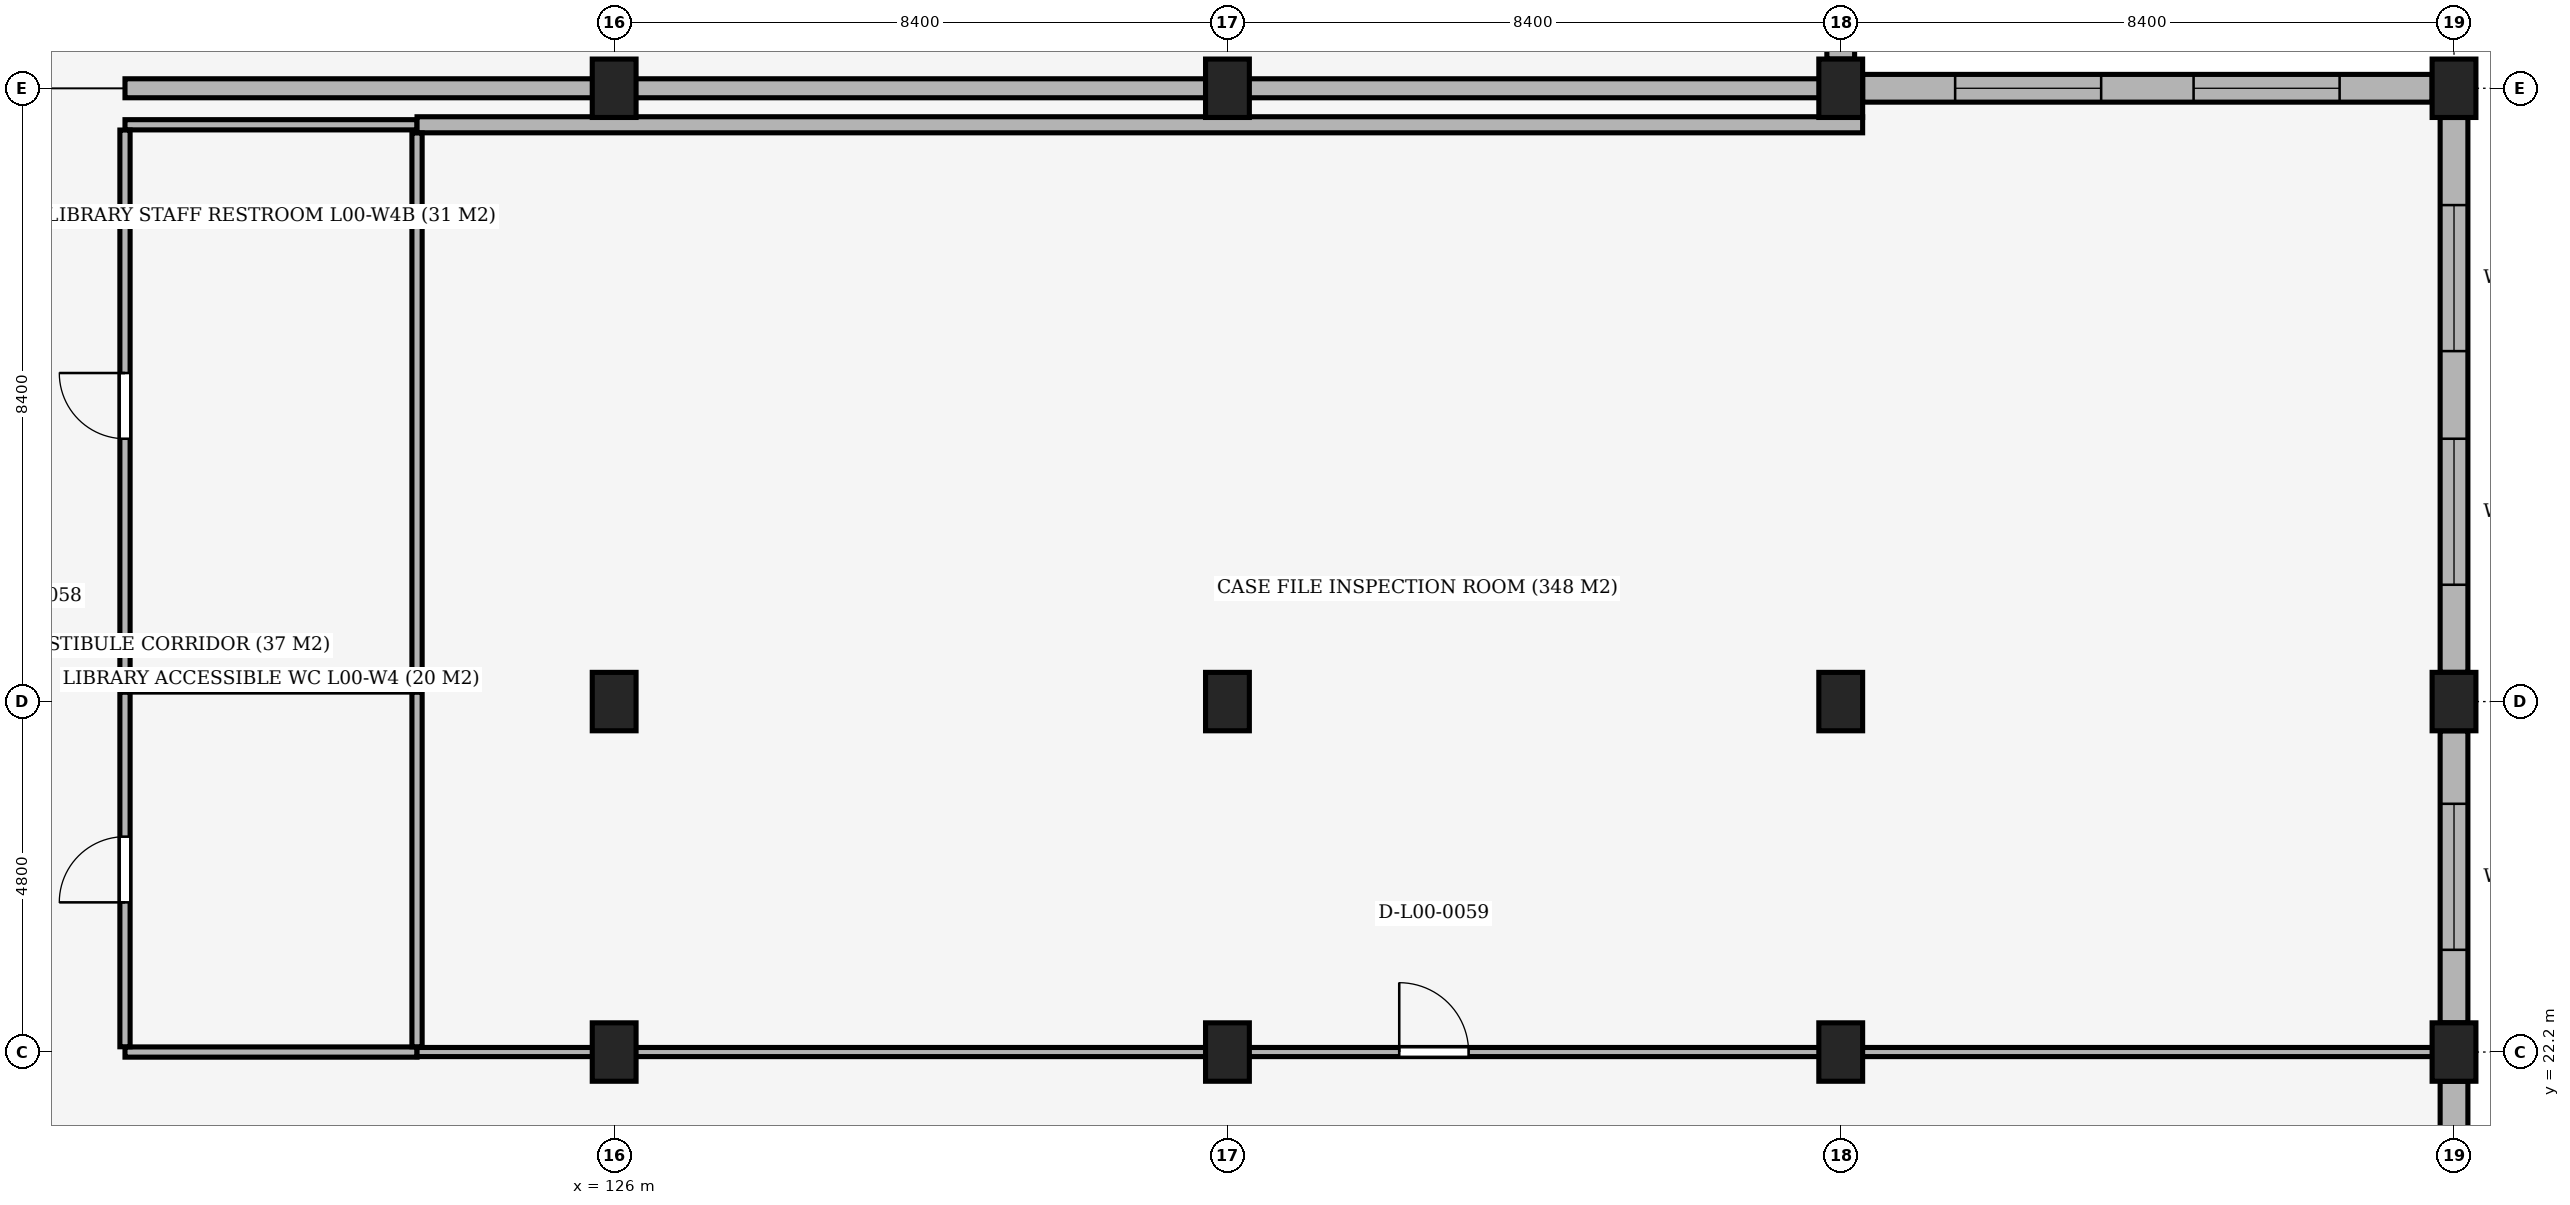
"""IFC4 building model, lengths in metres.
Left out: names, types, materials, properties, quantities, classifications, styles, units other than length and angle.
Written with IfcOpenShell. Run it as: python <this file> out.ifc"""

import sys

from ifc_helpers import new_model, si_unit, direction, frame, frame_2d, origin, origin_2d, place, context, subcontext, project, spatial, rectangle, extrude, element, fill, save


model = new_model("IFC4")
c1 = context("Model", 3, precision=1e-05, world=origin(), true_north=direction((0.0, 1.0)))
c2 = subcontext(c1, "Body", "Model", "MODEL_VIEW")
j1 = project(units=[si_unit("LENGTHUNIT", "METRE"), si_unit("PLANEANGLEUNIT", "RADIAN")], contexts=[c1])
p1 = place(None, origin())
s1 = spatial("IfcSite", under=j1, at=p1, CompositionType="ELEMENT")
p2 = place(p1, origin())
s2 = spatial("IfcBuilding", under=s1, at=p2, CompositionType="ELEMENT")
p3 = place(p2, origin())
s3 = spatial("IfcBuildingStorey", under=s2, at=p3, CompositionType="ELEMENT", Elevation=0.0)
for number, where, z_axis, x_axis in (
    (1, (126.0, 22.2, 0.0), (0.0, 0.0, 1.0), (1.0, 0.0, 0.0)),
    (2, (126.0, 27.0, 0.0), (0.0, 0.0, 1.0), (1.0, 0.0, 0.0)),
    (3, (126.0, 35.4, 0.0), (0.0, 0.0, 1.0), (1.0, 0.0, 0.0)),
    (4, (134.4, 22.2, 0.0), (0.0, 0.0, 1.0), (1.0, 0.0, 0.0)),
    (5, (134.4, 27.0, 0.0), (0.0, 0.0, 1.0), (1.0, 0.0, 0.0)),
    (6, (134.4, 35.4, 0.0), (0.0, 0.0, 1.0), (1.0, 0.0, 0.0)),
    (7, (142.8, 22.2, 0.0), (0.0, 0.0, 1.0), (1.0, 0.0, 0.0)),
    (8, (142.8, 27.0, 0.0), (0.0, 0.0, 1.0), (1.0, 0.0, 0.0)),
    (9, (142.8, 35.4, 0.0), (0.0, 0.0, 1.0), (1.0, 0.0, 0.0)),
    (10, (151.2, 22.2, 0.0), (0.0, 0.0, 1.0), (1.0, 0.0, 0.0)),
    (11, (151.2, 27.0, 0.0), (0.0, 0.0, 1.0), (1.0, 0.0, 0.0)),
    (12, (151.2, 35.4, 0.0), (0.0, 0.0, 1.0), (1.0, 0.0, 0.0)),
):
    element("IfcColumn", number, at=place(p3, frame(where, z_axis=z_axis, x_axis=x_axis)), inside=s3, PredefinedType="COLUMN", context=c2, shape_type="SweptSolid", body=[
        extrude(rectangle(XDim=0.6, YDim=0.8, at=origin_2d()), origin(), (0.0, 0.0, 1.0), 5.1),
    ])
p4 = place(p3, frame((142.8, 40.575, 0.0), z_axis=(0.0, 0.0, 1.0), x_axis=(0.0, -1.0, 0.0)))
e13 = element("IfcWall", 13, at=p4, inside=s3, PredefinedType="SOLIDWALL", context=c2, shape_type="SweptSolid", body=[
    extrude(rectangle(XDim=4.775, YDim=0.38, at=frame_2d((2.387, 0.0))), origin(), (0.0, 0.0, 1.0), 4.02),
])
p5 = place(p4, frame((1.388, 0.0, 2.1)))
e14 = element("IfcOpeningElement", 14, at=p5, cuts=e13, PredefinedType="OPENING", context=c2, shape_type="SweptSolid", body=[
    extrude(rectangle(XDim=2.0, YDim=1.2, at=frame_2d((1.0, 0.6))), frame((0.0, 0.205, 0.0), z_axis=(0.0, -1.0, 0.0), x_axis=(1.0, 0.0, 0.0)), (0.0, 0.0, 1.0), 0.41),
])
p6 = place(p3, frame((143.1, 35.4, 0.0), z_axis=(0.0, 0.0, 1.0), x_axis=(1.0, 0.0, 0.0)))
e15 = element("IfcWall", 15, at=p6, inside=s3, PredefinedType="SOLIDWALL", context=c2, shape_type="SweptSolid", body=[
    extrude(rectangle(XDim=7.8, YDim=0.38, at=frame_2d((3.9, 0.0))), origin(), (0.0, 0.0, 1.0), 4.07),
])
p7 = place(p6, frame((1.267, 0.0, 2.1)))
e16 = element("IfcOpeningElement", 16, at=p7, cuts=e15, PredefinedType="OPENING", context=c2, shape_type="SweptSolid", body=[
    extrude(rectangle(XDim=2.0, YDim=1.2, at=frame_2d((1.0, 0.6))), frame((0.0, 0.205, 0.0), z_axis=(0.0, -1.0, 0.0), x_axis=(1.0, 0.0, 0.0)), (0.0, 0.0, 1.0), 0.41),
])
p8 = place(p6, frame((4.533, 0.0, 2.1)))
e17 = element("IfcOpeningElement", 17, at=p8, cuts=e15, PredefinedType="OPENING", context=c2, shape_type="SweptSolid", body=[
    extrude(rectangle(XDim=2.0, YDim=1.2, at=frame_2d((1.0, 0.6))), frame((0.0, 0.205, 0.0), z_axis=(0.0, -1.0, 0.0), x_axis=(1.0, 0.0, 0.0)), (0.0, 0.0, 1.0), 0.41),
])
p9 = place(p3, frame((151.2, 35.0, 0.0), z_axis=(0.0, 0.0, 1.0), x_axis=(0.0, -1.0, 0.0)))
e18 = element("IfcWall", 18, at=p9, inside=s3, PredefinedType="SOLIDWALL", context=c2, shape_type="SweptSolid", body=[
    extrude(rectangle(XDim=7.6, YDim=0.38, at=frame_2d((3.8, 0.0))), origin(), (0.0, 0.0, 1.0), 4.02),
])
p10 = place(p9, frame((1.2, 0.0, 2.1)))
e19 = element("IfcOpeningElement", 19, at=p10, cuts=e18, PredefinedType="OPENING", context=c2, shape_type="SweptSolid", body=[
    extrude(rectangle(XDim=2.0, YDim=1.2, at=frame_2d((1.0, 0.6))), frame((0.0, 0.205, 0.0), z_axis=(0.0, -1.0, 0.0), x_axis=(1.0, 0.0, 0.0)), (0.0, 0.0, 1.0), 0.41),
])
p11 = place(p9, frame((4.4, 0.0, 2.1)))
e20 = element("IfcOpeningElement", 20, at=p11, cuts=e18, PredefinedType="OPENING", context=c2, shape_type="SweptSolid", body=[
    extrude(rectangle(XDim=2.0, YDim=1.2, at=frame_2d((1.0, 0.6))), frame((0.0, 0.205, 0.0), z_axis=(0.0, -1.0, 0.0), x_axis=(1.0, 0.0, 0.0)), (0.0, 0.0, 1.0), 0.41),
])
p12 = place(p3, frame((151.2, 26.6, 0.0), z_axis=(0.0, 0.0, 1.0), x_axis=(0.0, -1.0, 0.0)))
e21 = element("IfcWall", 21, at=p12, inside=s3, PredefinedType="SOLIDWALL", context=c2, shape_type="SweptSolid", body=[
    extrude(rectangle(XDim=4.0, YDim=0.38, at=frame_2d((2.0, 0.0))), origin(), (0.0, 0.0, 1.0), 4.17),
])
p13 = place(p12, frame((1.0, 0.0, 2.1)))
e22 = element("IfcOpeningElement", 22, at=p13, cuts=e21, PredefinedType="OPENING", context=c2, shape_type="SweptSolid", body=[
    extrude(rectangle(XDim=2.0, YDim=1.2, at=frame_2d((1.0, 0.6))), frame((0.0, 0.205, 0.0), z_axis=(0.0, -1.0, 0.0), x_axis=(1.0, 0.0, 0.0)), (0.0, 0.0, 1.0), 0.41),
])
p14 = place(p3, frame((151.2, 21.8, 0.0), z_axis=(0.0, 0.0, 1.0), x_axis=(0.0, -1.0, 0.0)))
e23 = element("IfcWall", 23, at=p14, inside=s3, PredefinedType="SOLIDWALL", context=c2, shape_type="SweptSolid", body=[
    extrude(rectangle(XDim=16.0, YDim=0.38, at=frame_2d((8.0, 0.0))), origin(), (0.0, 0.0, 1.0), 3.67),
])
p15 = place(p14, frame((4.0, 0.0, 2.1)))
e24 = element("IfcOpeningElement", 24, at=p15, cuts=e23, PredefinedType="OPENING", context=c2, shape_type="SweptSolid", body=[
    extrude(rectangle(XDim=2.0, YDim=1.2, at=frame_2d((1.0, 0.6))), frame((0.0, 0.205, 0.0), z_axis=(0.0, -1.0, 0.0), x_axis=(1.0, 0.0, 0.0)), (0.0, 0.0, 1.0), 0.41),
])
p16 = place(p14, frame((10.0, 0.0, 2.1)))
e25 = element("IfcOpeningElement", 25, at=p16, cuts=e23, PredefinedType="OPENING", context=c2, shape_type="SweptSolid", body=[
    extrude(rectangle(XDim=2.0, YDim=1.2, at=frame_2d((1.0, 0.6))), frame((0.0, 0.205, 0.0), z_axis=(0.0, -1.0, 0.0), x_axis=(1.0, 0.0, 0.0)), (0.0, 0.0, 1.0), 0.41),
])
p17 = place(p3, frame((119.3, 22.2, 0.0), z_axis=(0.0, 0.0, 1.0), x_axis=(1.0, 0.0, 0.0)))
e26 = element("IfcWall", 26, at=p17, inside=s3, PredefinedType="PARTITIONING", context=c2, shape_type="SweptSolid", body=[
    extrude(rectangle(XDim=4.0, YDim=0.14, at=frame_2d((2.0, 0.0))), origin(), (0.0, 0.0, 1.0), 4.07),
])
p18 = place(p3, frame((123.3, 22.2, 0.0), z_axis=(0.0, 0.0, 1.0), x_axis=(1.0, 0.0, 0.0)))
e27 = element("IfcWall", 27, at=p18, inside=s3, PredefinedType="PARTITIONING", context=c2, shape_type="SweptSolid", body=[
    extrude(rectangle(XDim=27.855, YDim=0.125, at=frame_2d((13.927, 0.0))), origin(), (0.0, 0.0, 1.0), 3.67),
])
p19 = place(p18, frame((13.453, 0.0, 0.0)))
e28 = element("IfcOpeningElement", 28, at=p19, cuts=e27, PredefinedType="OPENING", context=c2, shape_type="SweptSolid", body=[
    extrude(rectangle(XDim=0.95, YDim=2.2, at=frame_2d((0.475, 1.1))), frame((0.0, 0.077, 0.0), z_axis=(0.0, -1.0, 0.0), x_axis=(1.0, 0.0, 0.0)), (0.0, 0.0, 1.0), 0.155),
])
p20 = place(p3, frame((119.3, 27.2, 0.0), z_axis=(0.0, 0.0, 1.0), x_axis=(1.0, 0.0, 0.0)))
e29 = element("IfcWall", 29, at=p20, inside=s3, PredefinedType="PARTITIONING", context=c2, shape_type="SweptSolid", body=[
    extrude(rectangle(XDim=4.0, YDim=0.14, at=frame_2d((2.0, 0.0))), origin(), (0.0, 0.0, 1.0), 4.07),
])
p21 = place(p3, frame((119.3, 34.9, 0.0), z_axis=(0.0, 0.0, 1.0), x_axis=(1.0, 0.0, 0.0)))
e30 = element("IfcWall", 30, at=p21, inside=s3, PredefinedType="PARTITIONING", context=c2, shape_type="SweptSolid", body=[
    extrude(rectangle(XDim=4.0, YDim=0.14, at=frame_2d((2.0, 0.0))), origin(), (0.0, 0.0, 1.0), 4.82),
])
p22 = place(p3, frame((123.3, 34.9, 0.0), z_axis=(0.0, 0.0, 1.0), x_axis=(1.0, 0.0, 0.0)))
e31 = element("IfcWall", 31, at=p22, inside=s3, PredefinedType="PARTITIONING", context=c2, shape_type="SweptSolid", body=[
    extrude(rectangle(XDim=19.8, YDim=0.22, at=frame_2d((9.9, 0.0))), origin(), (0.0, 0.0, 1.0), 4.02),
])
p23 = place(p3, frame((119.3, 35.4, 0.0), z_axis=(0.0, 0.0, 1.0), x_axis=(1.0, 0.0, 0.0)))
e32 = element("IfcWall", 32, at=p23, inside=s3, PredefinedType="PARTITIONING", context=c2, shape_type="SweptSolid", body=[
    extrude(rectangle(XDim=23.481, YDim=0.26, at=frame_2d((11.74, 0.0))), origin(), (0.0, 0.0, 1.0), 4.07),
])
p24 = place(p3, frame((119.3, 22.272, 0.0), z_axis=(0.0, 0.0, 1.0), x_axis=(0.0, 1.0, 0.0)))
e33 = element("IfcWall", 33, at=p24, inside=s3, PredefinedType="PARTITIONING", context=c2, shape_type="SweptSolid", body=[
    extrude(rectangle(XDim=4.856, YDim=0.14, at=frame_2d((2.428, 0.0))), origin(), (0.0, 0.0, 1.0), 4.07),
])
p25 = place(p24, frame((1.978, 0.0, 0.0)))
e34 = element("IfcOpeningElement", 34, at=p25, cuts=e33, PredefinedType="OPENING", context=c2, shape_type="SweptSolid", body=[
    extrude(rectangle(XDim=0.9, YDim=2.1, at=frame_2d((0.45, 1.05))), frame((0.0, 0.085, 0.0), z_axis=(0.0, -1.0, 0.0), x_axis=(1.0, 0.0, 0.0)), (0.0, 0.0, 1.0), 0.17),
])
p26 = place(p3, frame((119.3, 27.272, 0.0), z_axis=(0.0, 0.0, 1.0), x_axis=(0.0, 1.0, 0.0)))
e35 = element("IfcWall", 35, at=p26, inside=s3, PredefinedType="PARTITIONING", context=c2, shape_type="SweptSolid", body=[
    extrude(rectangle(XDim=7.556, YDim=0.14, at=frame_2d((3.778, 0.0))), origin(), (0.0, 0.0, 1.0), 4.07),
])
p27 = place(p26, frame((3.328, 0.0, 0.0)))
e36 = element("IfcOpeningElement", 36, at=p27, cuts=e35, PredefinedType="OPENING", context=c2, shape_type="SweptSolid", body=[
    extrude(rectangle(XDim=0.9, YDim=2.1, at=frame_2d((0.45, 1.05))), frame((0.0, 0.085, 0.0), z_axis=(0.0, -1.0, 0.0), x_axis=(1.0, 0.0, 0.0)), (0.0, 0.0, 1.0), 0.17),
])
p28 = place(p3, frame((123.3, 22.272, 0.0), z_axis=(0.0, 0.0, 1.0), x_axis=(0.0, 1.0, 0.0)))
e37 = element("IfcWall", 37, at=p28, inside=s3, PredefinedType="PARTITIONING", context=c2, shape_type="SweptSolid", body=[
    extrude(rectangle(XDim=4.856, YDim=0.14, at=frame_2d((2.428, 0.0))), origin(), (0.0, 0.0, 1.0), 4.07),
])
p29 = place(p3, frame((123.3, 27.272, 0.0), z_axis=(0.0, 0.0, 1.0), x_axis=(0.0, 1.0, 0.0)))
e38 = element("IfcWall", 38, at=p29, inside=s3, PredefinedType="PARTITIONING", context=c2, shape_type="SweptSolid", body=[
    extrude(rectangle(XDim=7.516, YDim=0.14, at=frame_2d((3.758, 0.0))), origin(), (0.0, 0.0, 1.0), 4.07),
])
p30 = place(p7, origin())
e39 = element("IfcWindow", 39, at=p30, inside=s3, PartitioningType="SINGLE_PANEL", PredefinedType="WINDOW", context=c2, shape_type="SweptSolid", body=[
    extrude(rectangle(XDim=2.0, YDim=1.2, at=frame_2d((1.0, 0.6))), frame((0.0, 0.03, 0.0), z_axis=(0.0, -1.0, 0.0), x_axis=(1.0, 0.0, 0.0)), (0.0, 0.0, 1.0), 0.06),
])
fill(e16, e39)
p31 = place(p8, origin())
e40 = element("IfcWindow", 40, at=p31, inside=s3, PartitioningType="SINGLE_PANEL", PredefinedType="WINDOW", context=c2, shape_type="SweptSolid", body=[
    extrude(rectangle(XDim=2.0, YDim=1.2, at=frame_2d((1.0, 0.6))), frame((0.0, 0.03, 0.0), z_axis=(0.0, -1.0, 0.0), x_axis=(1.0, 0.0, 0.0)), (0.0, 0.0, 1.0), 0.06),
])
fill(e17, e40)
p32 = place(p10, origin())
e41 = element("IfcWindow", 41, at=p32, inside=s3, PartitioningType="SINGLE_PANEL", PredefinedType="WINDOW", context=c2, shape_type="SweptSolid", body=[
    extrude(rectangle(XDim=2.0, YDim=1.2, at=frame_2d((1.0, 0.6))), frame((0.0, 0.03, 0.0), z_axis=(0.0, -1.0, 0.0), x_axis=(1.0, 0.0, 0.0)), (0.0, 0.0, 1.0), 0.06),
])
fill(e19, e41)
p33 = place(p11, origin())
e42 = element("IfcWindow", 42, at=p33, inside=s3, PartitioningType="SINGLE_PANEL", PredefinedType="WINDOW", context=c2, shape_type="SweptSolid", body=[
    extrude(rectangle(XDim=2.0, YDim=1.2, at=frame_2d((1.0, 0.6))), frame((0.0, 0.03, 0.0), z_axis=(0.0, -1.0, 0.0), x_axis=(1.0, 0.0, 0.0)), (0.0, 0.0, 1.0), 0.06),
])
fill(e20, e42)
p34 = place(p13, origin())
e43 = element("IfcWindow", 43, at=p34, inside=s3, PartitioningType="SINGLE_PANEL", PredefinedType="WINDOW", context=c2, shape_type="SweptSolid", body=[
    extrude(rectangle(XDim=2.0, YDim=1.2, at=frame_2d((1.0, 0.6))), frame((0.0, 0.03, 0.0), z_axis=(0.0, -1.0, 0.0), x_axis=(1.0, 0.0, 0.0)), (0.0, 0.0, 1.0), 0.06),
])
fill(e22, e43)
p35 = place(p25, origin())
e44 = element("IfcDoor", 44, at=p35, inside=s3, OperationType="SINGLE_SWING_LEFT", PredefinedType="DOOR", context=c2, shape_type="SweptSolid", body=[
    extrude(rectangle(XDim=0.9, YDim=2.1, at=frame_2d((0.45, 1.05))), frame((0.0, 0.025, 0.0), z_axis=(0.0, -1.0, 0.0), x_axis=(1.0, 0.0, 0.0)), (0.0, 0.0, 1.0), 0.05),
])
fill(e34, e44)
p36 = place(p27, origin())
e45 = element("IfcDoor", 45, at=p36, inside=s3, OperationType="SINGLE_SWING_RIGHT", PredefinedType="DOOR", context=c2, shape_type="SweptSolid", body=[
    extrude(rectangle(XDim=0.9, YDim=2.1, at=frame_2d((0.45, 1.05))), frame((0.0, 0.025, 0.0), z_axis=(0.0, -1.0, 0.0), x_axis=(1.0, 0.0, 0.0)), (0.0, 0.0, 1.0), 0.05),
])
fill(e36, e45)
p37 = place(p19, origin())
e46 = element("IfcDoor", 46, at=p37, inside=s3, OperationType="SINGLE_SWING_LEFT", PredefinedType="DOOR", context=c2, shape_type="SweptSolid", body=[
    extrude(rectangle(XDim=0.95, YDim=2.2, at=frame_2d((0.475, 1.1))), frame((0.0, 0.025, 0.0), z_axis=(0.0, -1.0, 0.0), x_axis=(1.0, 0.0, 0.0)), (0.0, 0.0, 1.0), 0.05),
])
fill(e28, e46)
save(model, sys.argv[1])
